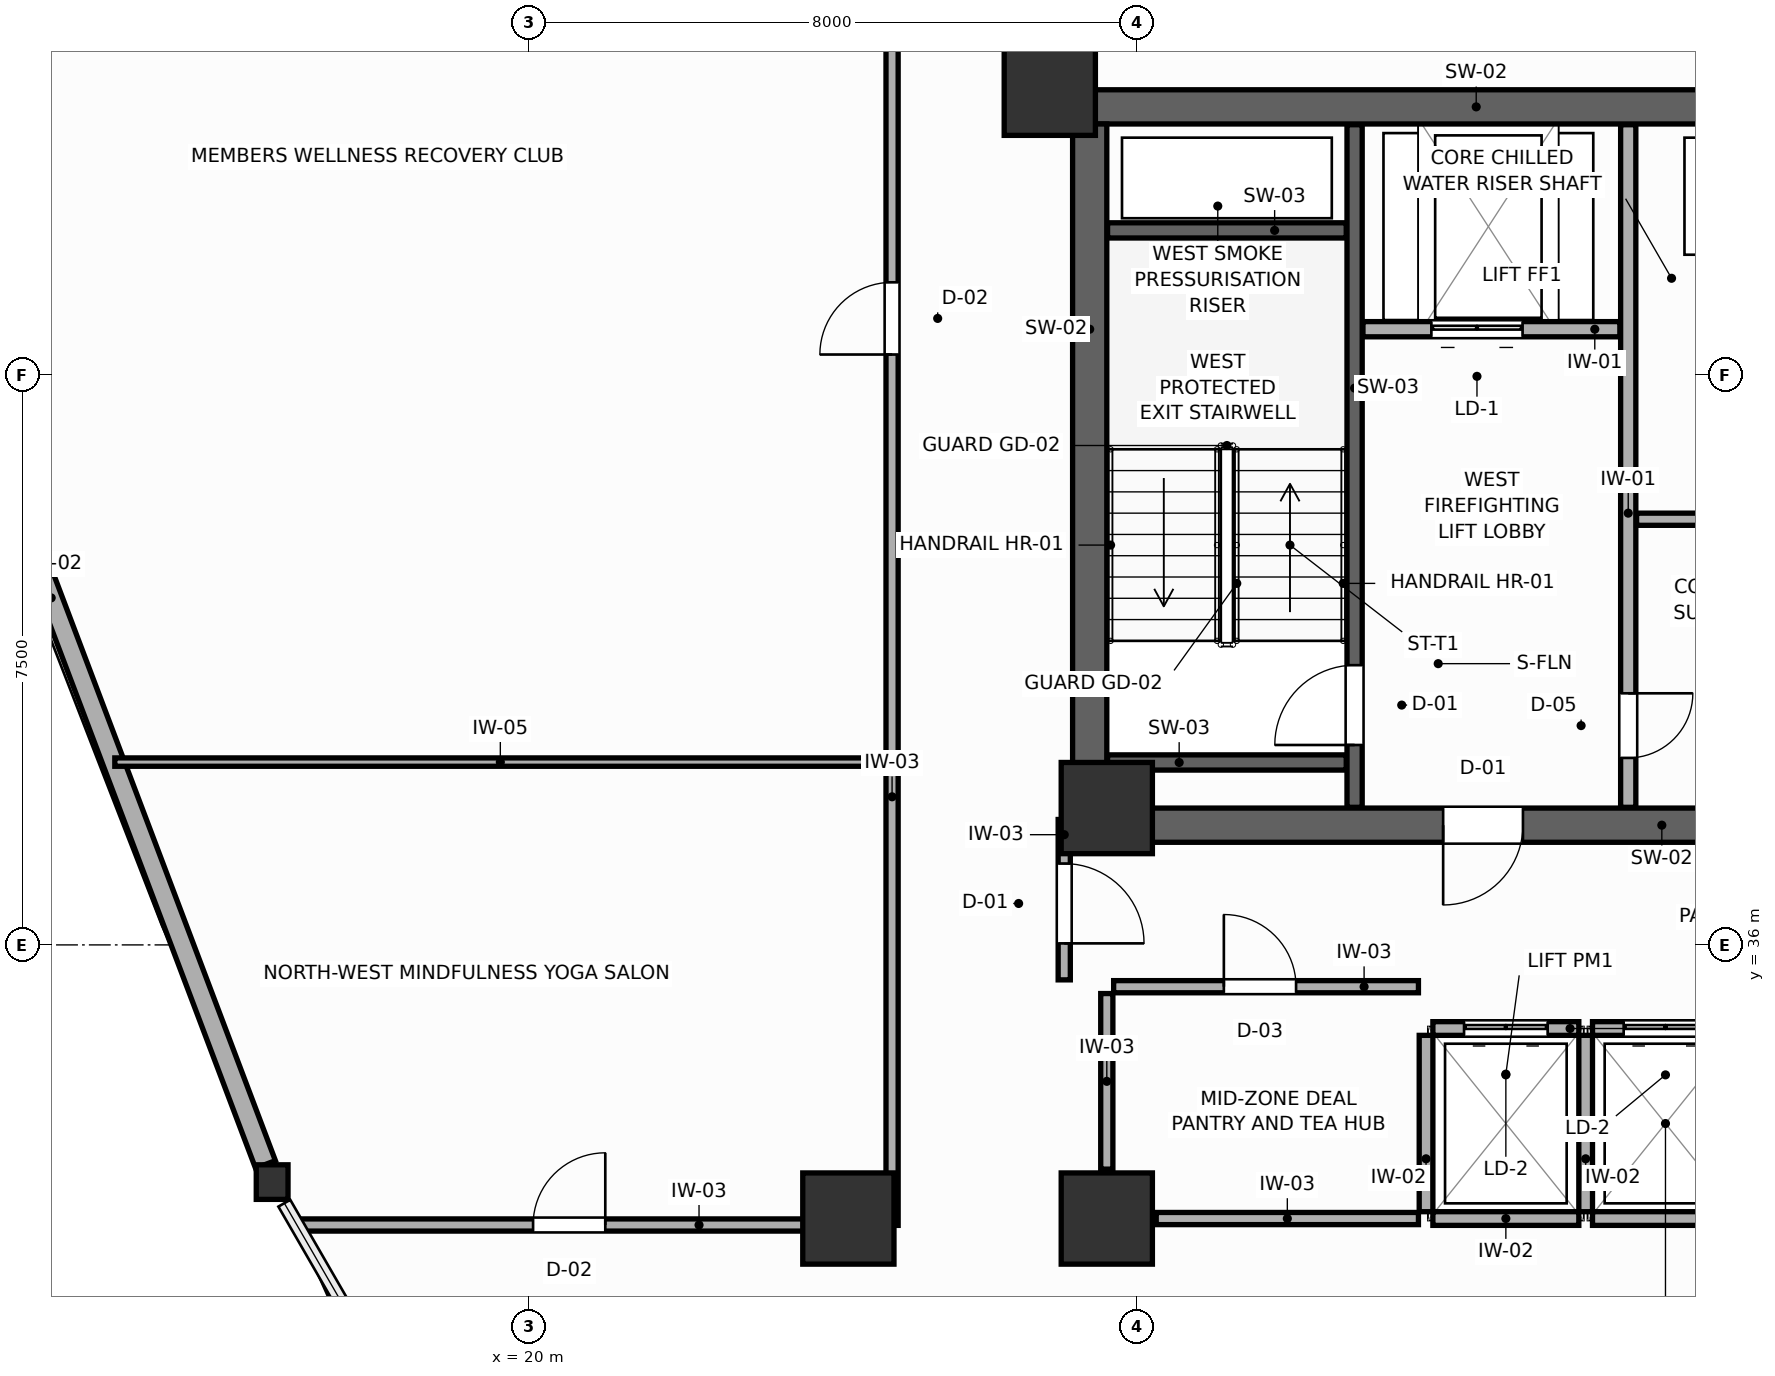
"""IFC4 building model, lengths in metres.
Left out: names, types, materials, properties, quantities, classifications, styles, units other than length and angle.
Written with IfcOpenShell. Run it as: python <this file> out.ifc"""

import sys

from ifc_helpers import new_model, si_unit, direction, frame, frame_2d, origin, origin_2d, place, context, subcontext, project, spatial, rectangle, i_section, extrude, source, transform, mapped, element, fill, save


model = new_model("IFC4")
c1 = context("Model", 3, precision=1e-05, world=origin(), true_north=direction((0.0, 1.0)))
c2 = subcontext(c1, "Body", "Model", "MODEL_VIEW")
j1 = project(units=[si_unit("LENGTHUNIT", "METRE"), si_unit("PLANEANGLEUNIT", "RADIAN")], contexts=[c1])
p1 = place(None, origin())
s1 = spatial("IfcSite", under=j1, at=p1, CompositionType="ELEMENT")
p2 = place(p1, origin())
s2 = spatial("IfcBuilding", under=s1, at=p2, CompositionType="ELEMENT")
p3 = place(p2, frame((0.0, 0.0, 109.8)))
s3 = spatial("IfcBuildingStorey", under=s2, at=p3, CompositionType="ELEMENT", Elevation=109.8)
p4 = place(p3, frame((27.15, 47.025, 0.0), z_axis=(0.0, 0.0, 1.0), x_axis=(1.0, 0.0, 0.0)))
e1 = element("IfcWall", 1, at=p4, inside=s3, PredefinedType="SHEAR", context=c2, shape_type="SweptSolid", body=[
    extrude(rectangle(XDim=17.7, YDim=0.45, at=frame_2d((8.85, 0.0))), origin(), (0.0, 0.0, 1.0), 3.6),
])
p5 = place(p3, frame((27.15, 37.575, 0.0), z_axis=(0.0, 0.0, 1.0), x_axis=(1.0, 0.0, 0.0)))
e2 = element("IfcWall", 2, at=p5, inside=s3, PredefinedType="SHEAR", context=c2, shape_type="SweptSolid", body=[
    extrude(rectangle(XDim=17.7, YDim=0.45, at=frame_2d((8.85, 0.0))), origin(), (0.0, 0.0, 1.0), 3.6),
])
p6 = place(p5, frame((4.875, 0.0, 0.0)))
e3 = element("IfcOpeningElement", 3, at=p6, cuts=e2, PredefinedType="OPENING", context=c2, shape_type="SweptSolid", body=[
    extrude(rectangle(XDim=1.05, YDim=2.1, at=frame_2d((0.525, 1.05))), frame((0.0, 0.235, 0.0), z_axis=(0.0, -1.0, 0.0), x_axis=(1.0, 0.0, 0.0)), (0.0, 0.0, 1.0), 0.47),
])
p7 = place(p5, frame((11.775, 0.0, 0.0)))
e4 = element("IfcOpeningElement", 4, at=p7, cuts=e2, PredefinedType="OPENING", context=c2, shape_type="SweptSolid", body=[
    extrude(rectangle(XDim=1.05, YDim=2.1, at=frame_2d((0.525, 1.05))), frame((0.0, 0.235, 0.0), z_axis=(0.0, -1.0, 0.0), x_axis=(1.0, 0.0, 0.0)), (0.0, 0.0, 1.0), 0.47),
])
p8 = place(p3, frame((27.375, 37.8, 0.0), z_axis=(0.0, 0.0, 1.0), x_axis=(0.0, 1.0, 0.0)))
e5 = element("IfcWall", 5, at=p8, inside=s3, PredefinedType="SHEAR", context=c2, shape_type="SweptSolid", body=[
    extrude(rectangle(XDim=9.0, YDim=0.45, at=frame_2d((4.5, 0.0))), origin(), (0.0, 0.0, 1.0), 3.6),
])
m1 = source(origin(), c2, "Body", "SweptSolid", [
    extrude(rectangle(XDim=1.2, YDim=1.2, at=origin_2d()), origin(), (0.0, 0.0, 1.0), 3.6),
])
for number, where, z_axis, x_axis in (
    (6, (26.85, 47.25, 0.0), (0.0, 0.0, 1.0), (1.0, 0.0, 0.0)),
    (7, (27.6, 37.8, 0.0), (0.0, 0.0, 1.0), (1.0, 0.0, 0.0)),
    (8, (27.6, 32.4, 0.0), (0.0, 0.0, 1.0), (1.0, 0.0, 0.0)),
    (9, (24.2, 32.4, 0.0), (0.0, 0.0, 1.0), (1.0, 0.0, 0.0)),
):
    element("IfcColumn", number, at=place(p3, frame(where, z_axis=z_axis, x_axis=x_axis)), inside=s3, PredefinedType="COLUMN", context=c2, shape_type="MappedRepresentation", body=[
        mapped(m1, transform((0.0, 0.0, 0.0), scale=1.0)),
    ])
m2 = source(origin(), c2, "Body", "SweptSolid", [
    extrude(i_section(OverallWidth=0.418, OverallDepth=0.455, WebThickness=0.039, FlangeThickness=0.063, FilletRadius=0.015, at=origin_2d()), origin(), (0.0, 0.0, 1.0), 3.6),
])
p9 = place(p3, frame((16.619, 32.879, 0.0), z_axis=(0.0, 0.0, 1.0), x_axis=(1.0, 0.0, 0.0)))
e10 = element("IfcColumn", 10, at=p9, inside=s3, PredefinedType="COLUMN", context=c2, shape_type="MappedRepresentation", body=[
    mapped(m2, transform((0.0, 0.0, 0.0), scale=1.0)),
])
p10 = place(p3, frame((10.893, 48.019, 0.0), z_axis=(0.0, 0.0, 1.0), x_axis=(0.353771130195, -0.935332019895, 0.0)))
e11 = element("IfcWall", 11, at=p10, inside=s3, PredefinedType="SOLIDWALL", context=c2, shape_type="SweptSolid", body=[
    extrude(rectangle(XDim=15.937, YDim=0.28, at=frame_2d((7.969, 0.0))), origin(), (0.0, 0.0, 1.0), 1.87),
])
p11 = place(p3, frame((30.86, 37.81, 0.0), z_axis=(0.0, 0.0, 1.0), x_axis=(0.0, 1.0, 0.0)))
e12 = element("IfcWall", 12, at=p11, inside=s3, PredefinedType="SHEAR", context=c2, shape_type="SweptSolid", body=[
    extrude(rectangle(XDim=8.98, YDim=0.2, at=frame_2d((4.49, 0.0))), origin(), (0.0, 0.0, 1.0), 3.6),
])
p12 = place(p11, frame((0.82, 0.0, 0.0)))
e13 = element("IfcOpeningElement", 13, at=p12, cuts=e12, PredefinedType="OPENING", context=c2, shape_type="SweptSolid", body=[
    extrude(rectangle(XDim=1.05, YDim=2.1, at=frame_2d((0.525, 1.05))), frame((0.0, 0.11, 0.0), z_axis=(0.0, -1.0, 0.0), x_axis=(1.0, 0.0, 0.0)), (0.0, 0.0, 1.0), 0.22),
])
for number, where, z_axis, x_axis in (
    (14, (27.61, 45.4, 0.0), (0.0, 0.0, 1.0), (1.0, 0.0, 0.0)),
    (15, (27.61, 38.4, 0.0), (0.0, 0.0, 1.0), (1.0, 0.0, 0.0)),
):
    element("IfcWall", number, at=place(p3, frame(where, z_axis=z_axis, x_axis=x_axis)), inside=s3, PredefinedType="SHEAR", context=c2, shape_type="SweptSolid", body=[
        extrude(rectangle(XDim=3.14, YDim=0.2, at=frame_2d((1.57, 0.0))), origin(), (0.0, 0.0, 1.0), 3.6),
    ])
p13 = place(p3, frame((30.97, 44.1, 0.0), z_axis=(0.0, 0.0, 1.0), x_axis=(1.0, 0.0, 0.0)))
e16 = element("IfcWall", 16, at=p13, inside=s3, PredefinedType="PARTITIONING", context=c2, shape_type="SweptSolid", body=[
    extrude(rectangle(XDim=3.38, YDim=0.2, at=frame_2d((1.69, 0.0))), origin(), (0.0, 0.0, 1.0), 3.4),
])
p14 = place(p13, frame((0.9, 0.0, 0.0)))
e17 = element("IfcOpeningElement", 17, at=p14, cuts=e16, PredefinedType="OPENING", context=c2, shape_type="SweptSolid", body=[
    extrude(rectangle(XDim=1.2, YDim=2.1, at=frame_2d((0.6, 1.05))), frame((0.0, 0.11, 0.0), z_axis=(0.0, -1.0, 0.0), x_axis=(1.0, 0.0, 0.0)), (0.0, 0.0, 1.0), 0.22),
])
p15 = place(p3, frame((34.46, 37.81, 0.0), z_axis=(0.0, 0.0, 1.0), x_axis=(0.0, 1.0, 0.0)))
e18 = element("IfcWall", 18, at=p15, inside=s3, PredefinedType="PARTITIONING", context=c2, shape_type="SweptSolid", body=[
    extrude(rectangle(XDim=8.98, YDim=0.2, at=frame_2d((4.49, 0.0))), origin(), (0.0, 0.0, 1.0), 3.4),
])
p16 = place(p15, frame((0.65, 0.0, 0.0)))
e19 = element("IfcOpeningElement", 19, at=p16, cuts=e18, PredefinedType="OPENING", context=c2, shape_type="SweptSolid", body=[
    extrude(rectangle(XDim=0.85, YDim=2.05, at=frame_2d((0.425, 1.025))), frame((0.0, 0.11, 0.0), z_axis=(0.0, -1.0, 0.0), x_axis=(1.0, 0.0, 0.0)), (0.0, 0.0, 1.0), 0.22),
])
p17 = place(p3, frame((34.57, 41.6, 0.0), z_axis=(0.0, 0.0, 1.0), x_axis=(1.0, 0.0, 0.0)))
e20 = element("IfcWall", 20, at=p17, inside=s3, PredefinedType="PARTITIONING", context=c2, shape_type="SweptSolid", body=[
    extrude(rectangle(XDim=2.86, YDim=0.16, at=frame_2d((1.43, 0.0))), origin(), (0.0, 0.0, 1.0), 3.4),
])
p18 = place(p3, frame((31.89, 34.9, 0.0), z_axis=(0.0, 0.0, 1.0), x_axis=(1.0, 0.0, 0.0)))
e21 = element("IfcWall", 21, at=p18, inside=s3, PredefinedType="PARTITIONING", context=c2, shape_type="SweptSolid", body=[
    extrude(rectangle(XDim=1.92, YDim=0.18, at=frame_2d((0.96, 0.0))), origin(), (0.0, 0.0, 1.0), 3.4),
])
p19 = place(p18, frame((0.41, 0.0, 0.0)))
e22 = element("IfcOpeningElement", 22, at=p19, cuts=e21, PredefinedType="OPENING", context=c2, shape_type="SweptSolid", body=[
    extrude(rectangle(XDim=1.1, YDim=2.1, at=frame_2d((0.55, 1.05))), frame((0.0, 0.1, 0.0), z_axis=(0.0, -1.0, 0.0), x_axis=(1.0, 0.0, 0.0)), (0.0, 0.0, 1.0), 0.2),
])
p20 = place(p3, frame((31.89, 32.4, 0.0), z_axis=(0.0, 0.0, 1.0), x_axis=(1.0, 0.0, 0.0)))
e23 = element("IfcWall", 23, at=p20, inside=s3, PredefinedType="PARTITIONING", context=c2, shape_type="SweptSolid", body=[
    extrude(rectangle(XDim=1.92, YDim=0.18, at=frame_2d((0.96, 0.0))), origin(), (0.0, 0.0, 1.0), 2.16),
])
p21 = place(p3, frame((31.8, 32.49, 0.0), z_axis=(0.0, 0.0, 1.0), x_axis=(0.0, 1.0, 0.0)))
e24 = element("IfcWall", 24, at=p21, inside=s3, PredefinedType="PARTITIONING", context=c2, shape_type="SweptSolid", body=[
    extrude(rectangle(XDim=2.32, YDim=0.18, at=frame_2d((1.16, 0.0))), origin(), (0.0, 0.0, 1.0), 3.4),
])
p22 = place(p3, frame((33.99, 34.9, 0.0), z_axis=(0.0, 0.0, 1.0), x_axis=(1.0, 0.0, 0.0)))
e25 = element("IfcWall", 25, at=p22, inside=s3, PredefinedType="PARTITIONING", context=c2, shape_type="SweptSolid", body=[
    extrude(rectangle(XDim=1.92, YDim=0.18, at=frame_2d((0.96, 0.0))), origin(), (0.0, 0.0, 1.0), 3.4),
])
p23 = place(p22, frame((0.41, 0.0, 0.0)))
e26 = element("IfcOpeningElement", 26, at=p23, cuts=e25, PredefinedType="OPENING", context=c2, shape_type="SweptSolid", body=[
    extrude(rectangle(XDim=1.1, YDim=2.1, at=frame_2d((0.55, 1.05))), frame((0.0, 0.1, 0.0), z_axis=(0.0, -1.0, 0.0), x_axis=(1.0, 0.0, 0.0)), (0.0, 0.0, 1.0), 0.2),
])
p24 = place(p3, frame((33.99, 32.4, 0.0), z_axis=(0.0, 0.0, 1.0), x_axis=(1.0, 0.0, 0.0)))
e27 = element("IfcWall", 27, at=p24, inside=s3, PredefinedType="PARTITIONING", context=c2, shape_type="SweptSolid", body=[
    extrude(rectangle(XDim=1.92, YDim=0.18, at=frame_2d((0.96, 0.0))), origin(), (0.0, 0.0, 1.0), 2.16),
])
p25 = place(p3, frame((33.9, 32.49, 0.0), z_axis=(0.0, 0.0, 1.0), x_axis=(0.0, 1.0, 0.0)))
e28 = element("IfcWall", 28, at=p25, inside=s3, PredefinedType="PARTITIONING", context=c2, shape_type="SweptSolid", body=[
    extrude(rectangle(XDim=2.32, YDim=0.18, at=frame_2d((1.16, 0.0))), origin(), (0.0, 0.0, 1.0), 3.4),
])
p26 = place(p3, frame((28.25, 32.4, 0.0), z_axis=(0.0, 0.0, 1.0), x_axis=(1.0, 0.0, 0.0)))
e29 = element("IfcWall", 29, at=p26, inside=s3, PredefinedType="PARTITIONING", context=c2, shape_type="SweptSolid", body=[
    extrude(rectangle(XDim=3.45, YDim=0.16, at=frame_2d((1.725, 0.0))), origin(), (0.0, 0.0, 1.0), 2.16),
])
p27 = place(p3, frame((27.6, 33.05, 0.0), z_axis=(0.0, 0.0, 1.0), x_axis=(0.0, 1.0, 0.0)))
e30 = element("IfcWall", 30, at=p27, inside=s3, PredefinedType="PARTITIONING", context=c2, shape_type="SweptSolid", body=[
    extrude(rectangle(XDim=2.31, YDim=0.16, at=frame_2d((1.155, 0.0))), origin(), (0.0, 0.0, 1.0), 3.4),
])
p28 = place(p3, frame((27.69, 35.45, 0.0), z_axis=(0.0, 0.0, 1.0), x_axis=(1.0, 0.0, 0.0)))
e31 = element("IfcWall", 31, at=p28, inside=s3, PredefinedType="PARTITIONING", context=c2, shape_type="SweptSolid", body=[
    extrude(rectangle(XDim=4.01, YDim=0.16, at=frame_2d((2.005, 0.0))), origin(), (0.0, 0.0, 1.0), 3.4),
])
p29 = place(p28, frame((1.45, 0.0, 0.0)))
e32 = element("IfcOpeningElement", 32, at=p29, cuts=e31, PredefinedType="OPENING", context=c2, shape_type="SweptSolid", body=[
    extrude(rectangle(XDim=0.95, YDim=2.05, at=frame_2d((0.475, 1.025))), frame((0.0, 0.09, 0.0), z_axis=(0.0, -1.0, 0.0), x_axis=(1.0, 0.0, 0.0)), (0.0, 0.0, 1.0), 0.18),
])
p30 = place(p3, frame((27.04, 35.54, 0.0), z_axis=(0.0, 0.0, 1.0), x_axis=(0.0, 1.0, 0.0)))
e33 = element("IfcWall", 33, at=p30, inside=s3, PredefinedType="PARTITIONING", context=c2, shape_type="SweptSolid", body=[
    extrude(rectangle(XDim=2.11, YDim=0.16, at=frame_2d((1.055, 0.0))), origin(), (0.0, 0.0, 1.0), 3.4),
])
p31 = place(p30, frame((0.48, 0.0, 0.0)))
e34 = element("IfcOpeningElement", 34, at=p31, cuts=e33, PredefinedType="OPENING", context=c2, shape_type="SweptSolid", body=[
    extrude(rectangle(XDim=1.05, YDim=2.1, at=frame_2d((0.525, 1.05))), frame((0.0, 0.09, 0.0), z_axis=(0.0, -1.0, 0.0), x_axis=(1.0, 0.0, 0.0)), (0.0, 0.0, 1.0), 0.18),
])
p32 = place(p3, frame((24.775, 32.31, 0.0), z_axis=(0.0, 0.0, 1.0), x_axis=(0.0, 1.0, 0.0)))
e35 = element("IfcWall", 35, at=p32, inside=s3, PredefinedType="PARTITIONING", context=c2, shape_type="SweptSolid", body=[
    extrude(rectangle(XDim=21.322, YDim=0.16, at=frame_2d((10.661, 0.0))), origin(), (0.0, 0.0, 1.0), 3.4),
])
p33 = place(p32, frame((11.457, 0.0, 0.0)))
e36 = element("IfcOpeningElement", 36, at=p33, cuts=e35, PredefinedType="OPENING", context=c2, shape_type="SweptSolid", body=[
    extrude(rectangle(XDim=0.95, YDim=2.05, at=frame_2d((0.475, 1.025))), frame((0.0, 0.09, 0.0), z_axis=(0.0, -1.0, 0.0), x_axis=(1.0, 0.0, 0.0)), (0.0, 0.0, 1.0), 0.18),
])
p34 = place(p3, frame((16.965, 32.315, 0.0), z_axis=(0.0, 0.0, 1.0), x_axis=(1.0, 0.0, 0.0)))
e37 = element("IfcWall", 37, at=p34, inside=s3, PredefinedType="PARTITIONING", context=c2, shape_type="SweptSolid", body=[
    extrude(rectangle(XDim=7.728, YDim=0.16, at=frame_2d((3.864, 0.0))), origin(), (0.0, 0.0, 1.0), 2.16),
])
p35 = place(p34, frame((3.087, 0.0, 0.0)))
e38 = element("IfcOpeningElement", 38, at=p35, cuts=e37, PredefinedType="OPENING", context=c2, shape_type="SweptSolid", body=[
    extrude(rectangle(XDim=0.95, YDim=2.05, at=frame_2d((0.475, 1.025))), frame((0.0, 0.09, 0.0), z_axis=(0.0, -1.0, 0.0), x_axis=(1.0, 0.0, 0.0)), (0.0, 0.0, 1.0), 0.18),
])
p36 = place(p3, frame((27.035, 47.34, 0.0), z_axis=(0.0, 0.0, 1.0), x_axis=(0.0, 1.0, 0.0)))
e39 = element("IfcWall", 39, at=p36, inside=s3, PredefinedType="PARTITIONING", context=c2, shape_type="SweptSolid", body=[
    extrude(rectangle(XDim=6.661, YDim=0.16, at=frame_2d((3.331, 0.0))), origin(), (0.0, 0.0, 1.0), 2.16),
])
p37 = place(p36, frame((2.957, 0.0, 0.0)))
e40 = element("IfcOpeningElement", 40, at=p37, cuts=e39, PredefinedType="OPENING", context=c2, shape_type="SweptSolid", body=[
    extrude(rectangle(XDim=0.95, YDim=2.05, at=frame_2d((0.475, 1.025))), frame((0.0, 0.09, 0.0), z_axis=(0.0, -1.0, 0.0), x_axis=(1.0, 0.0, 0.0)), (0.0, 0.0, 1.0), 0.18),
])
p38 = place(p3, frame((14.549, 38.405, 0.0), z_axis=(0.0, 0.0, 1.0), x_axis=(1.0, 0.0, 0.0)))
e41 = element("IfcWall", 41, at=p38, inside=s3, PredefinedType="MOVABLE", context=c2, shape_type="SweptSolid", body=[
    extrude(rectangle(XDim=10.144, YDim=0.11, at=frame_2d((5.072, 0.0))), origin(), (0.0, 0.0, 1.0), 3.4),
])
p39 = place(p12, origin())
e42 = element("IfcDoor", 42, at=p39, inside=s3, OperationType="SINGLE_SWING_LEFT", PredefinedType="DOOR", context=c2, shape_type="SweptSolid", body=[
    extrude(rectangle(XDim=1.05, YDim=2.1, at=frame_2d((0.525, 1.05))), frame((0.0, 0.025, 0.0), z_axis=(0.0, -1.0, 0.0), x_axis=(1.0, 0.0, 0.0)), (0.0, 0.0, 1.0), 0.05),
])
fill(e13, e42)
p40 = place(p14, origin())
e43 = element("IfcDoor", 43, at=p40, inside=s3, OperationType="DOUBLE_DOOR_SLIDING", PredefinedType="DOOR", context=c2, shape_type="SweptSolid", body=[
    extrude(rectangle(XDim=1.2, YDim=2.1, at=frame_2d((0.6, 1.05))), frame((0.0, 0.025, 0.0), z_axis=(0.0, -1.0, 0.0), x_axis=(1.0, 0.0, 0.0)), (0.0, 0.0, 1.0), 0.05),
])
fill(e17, e43)
p41 = place(p16, frame((0.85, 0.0, 0.0), z_axis=(0.0, 0.0, 1.0), x_axis=(-1.0, 0.0, 0.0)))
e44 = element("IfcDoor", 44, at=p41, inside=s3, OperationType="SINGLE_SWING_LEFT", PredefinedType="DOOR", context=c2, shape_type="SweptSolid", body=[
    extrude(rectangle(XDim=0.85, YDim=2.05, at=frame_2d((0.425, 1.025))), frame((0.0, 0.025, 0.0), z_axis=(0.0, -1.0, 0.0), x_axis=(1.0, 0.0, 0.0)), (0.0, 0.0, 1.0), 0.05),
])
fill(e19, e44)
p42 = place(p19, origin())
e45 = element("IfcDoor", 45, at=p42, inside=s3, OperationType="DOUBLE_DOOR_SLIDING", PredefinedType="DOOR", context=c2, shape_type="SweptSolid", body=[
    extrude(rectangle(XDim=1.1, YDim=2.1, at=frame_2d((0.55, 1.05))), frame((0.0, 0.025, 0.0), z_axis=(0.0, -1.0, 0.0), x_axis=(1.0, 0.0, 0.0)), (0.0, 0.0, 1.0), 0.05),
])
fill(e22, e45)
p43 = place(p23, origin())
e46 = element("IfcDoor", 46, at=p43, inside=s3, OperationType="DOUBLE_DOOR_SLIDING", PredefinedType="DOOR", context=c2, shape_type="SweptSolid", body=[
    extrude(rectangle(XDim=1.1, YDim=2.1, at=frame_2d((0.55, 1.05))), frame((0.0, 0.025, 0.0), z_axis=(0.0, -1.0, 0.0), x_axis=(1.0, 0.0, 0.0)), (0.0, 0.0, 1.0), 0.05),
])
fill(e26, e46)
p44 = place(p29, origin())
e47 = element("IfcDoor", 47, at=p44, inside=s3, OperationType="SINGLE_SWING_LEFT", PredefinedType="DOOR", context=c2, shape_type="SweptSolid", body=[
    extrude(rectangle(XDim=0.95, YDim=2.05, at=frame_2d((0.475, 1.025))), frame((0.0, 0.025, 0.0), z_axis=(0.0, -1.0, 0.0), x_axis=(1.0, 0.0, 0.0)), (0.0, 0.0, 1.0), 0.05),
])
fill(e32, e47)
p45 = place(p31, frame((1.05, 0.0, 0.0), z_axis=(0.0, 0.0, 1.0), x_axis=(-1.0, 0.0, 0.0)))
e48 = element("IfcDoor", 48, at=p45, inside=s3, OperationType="SINGLE_SWING_RIGHT", PredefinedType="DOOR", context=c2, shape_type="SweptSolid", body=[
    extrude(rectangle(XDim=1.05, YDim=2.1, at=frame_2d((0.525, 1.05))), frame((0.0, 0.025, 0.0), z_axis=(0.0, -1.0, 0.0), x_axis=(1.0, 0.0, 0.0)), (0.0, 0.0, 1.0), 0.05),
])
fill(e34, e48)
p46 = place(p33, origin())
e49 = element("IfcDoor", 49, at=p46, inside=s3, OperationType="SINGLE_SWING_LEFT", PredefinedType="DOOR", context=c2, shape_type="SweptSolid", body=[
    extrude(rectangle(XDim=0.95, YDim=2.05, at=frame_2d((0.475, 1.025))), frame((0.0, 0.025, 0.0), z_axis=(0.0, -1.0, 0.0), x_axis=(1.0, 0.0, 0.0)), (0.0, 0.0, 1.0), 0.05),
])
fill(e36, e49)
p47 = place(p35, origin())
e50 = element("IfcDoor", 50, at=p47, inside=s3, OperationType="SINGLE_SWING_RIGHT", PredefinedType="DOOR", context=c2, shape_type="SweptSolid", body=[
    extrude(rectangle(XDim=0.95, YDim=2.05, at=frame_2d((0.475, 1.025))), frame((0.0, 0.025, 0.0), z_axis=(0.0, -1.0, 0.0), x_axis=(1.0, 0.0, 0.0)), (0.0, 0.0, 1.0), 0.05),
])
fill(e38, e50)
p48 = place(p6, frame((1.05, 0.0, 0.0), z_axis=(0.0, 0.0, 1.0), x_axis=(-1.0, 0.0, 0.0)))
e51 = element("IfcDoor", 51, at=p48, inside=s3, OperationType="SINGLE_SWING_RIGHT", PredefinedType="DOOR", context=c2, shape_type="SweptSolid", body=[
    extrude(rectangle(XDim=1.05, YDim=2.1, at=frame_2d((0.525, 1.05))), frame((0.0, 0.025, 0.0), z_axis=(0.0, -1.0, 0.0), x_axis=(1.0, 0.0, 0.0)), (0.0, 0.0, 1.0), 0.05),
])
fill(e3, e51)
save(model, sys.argv[1])
